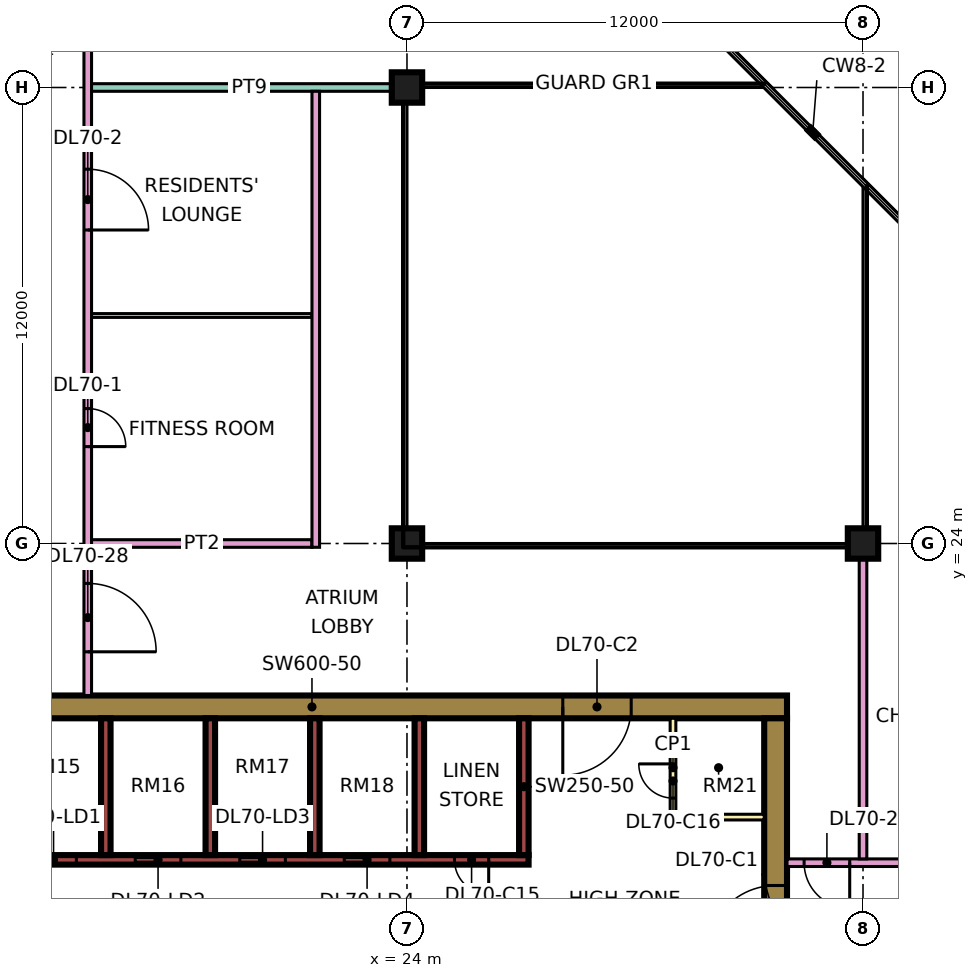
"""IFC4 building model, lengths in metres.
Left out: names, types, materials, properties, quantities, classifications, styles, units other than length and angle.
Written with IfcOpenShell. Run it as: python <this file> out.ifc"""

import sys

from ifc_helpers import new_model, si_unit, direction, frame, frame_2d, origin, origin_2d, place, context, subcontext, project, spatial, rectangle, extrude, element, fill, save


model = new_model("IFC4")
c1 = context("Model", 3, precision=1e-05, world=origin(), true_north=direction((0.0, 1.0)))
c2 = subcontext(c1, "Body", "Model", "MODEL_VIEW")
j1 = project(units=[si_unit("LENGTHUNIT", "METRE"), si_unit("PLANEANGLEUNIT", "RADIAN")], contexts=[c1])
p1 = place(None, origin())
s1 = spatial("IfcSite", under=j1, at=p1, CompositionType="ELEMENT")
p2 = place(p1, origin())
s2 = spatial("IfcBuilding", under=s1, at=p2, CompositionType="ELEMENT")
p3 = place(p2, frame((0.0, 0.0, 299.65)))
s3 = spatial("IfcBuildingStorey", under=s2, at=p3, CompositionType="ELEMENT", Elevation=299.65)
for number, where, z_axis, x_axis in (
    (1, (24.0, 24.0, 0.0), (0.0, 0.0, 1.0), (1.0, 0.0, 0.0)),
    (2, (24.0, 36.0, 0.0), (0.0, 0.0, 1.0), (1.0, 0.0, 0.0)),
    (3, (36.0, 24.0, 0.0), (0.0, 0.0, 1.0), (1.0, 0.0, 0.0)),
):
    element("IfcColumn", number, at=place(p3, frame(where, z_axis=z_axis, x_axis=x_axis)), inside=s3, PredefinedType="COLUMN", context=c2, shape_type="SweptSolid", body=[
        extrude(rectangle(XDim=0.8, YDim=0.8, at=origin_2d()), origin(), (0.0, 0.0, 1.0), 3.75),
    ])
p4 = place(p3, frame((9.0, 19.7, 0.0), z_axis=(0.0, 0.0, 1.0), x_axis=(1.0, 0.0, 0.0)))
e4 = element("IfcWall", 4, at=p4, inside=s3, PredefinedType="SHEAR", context=c2, shape_type="SweptSolid", body=[
    extrude(rectangle(XDim=25.0, YDim=0.6, at=frame_2d((12.5, 0.0))), origin(), (0.0, 0.0, 1.0), 3.75),
])
p5 = place(p4, frame((19.1, 0.0, 0.0)))
e5 = element("IfcOpeningElement", 5, at=p5, cuts=e4, PredefinedType="OPENING", context=c2, shape_type="SweptSolid", body=[
    extrude(rectangle(XDim=1.8, YDim=2.4, at=frame_2d((0.9, 1.2))), frame((0.0, 0.31, 0.0), z_axis=(0.0, -1.0, 0.0), x_axis=(1.0, 0.0, 0.0)), (0.0, 0.0, 1.0), 0.62),
])
p6 = place(p3, frame((33.7, 7.6, 0.0), z_axis=(0.0, 0.0, 1.0), x_axis=(0.0, 1.0, 0.0)))
e6 = element("IfcWall", 6, at=p6, inside=s3, PredefinedType="SHEAR", context=c2, shape_type="SweptSolid", body=[
    extrude(rectangle(XDim=11.8, YDim=0.6, at=frame_2d((5.9, 0.0))), origin(), (0.0, 0.0, 1.0), 3.75),
])
p7 = place(p6, frame((5.6, 0.0, 0.0)))
e7 = element("IfcOpeningElement", 7, at=p7, cuts=e6, PredefinedType="OPENING", context=c2, shape_type="SweptSolid", body=[
    extrude(rectangle(XDim=1.8, YDim=2.4, at=frame_2d((0.9, 1.2))), frame((0.0, 0.31, 0.0), z_axis=(0.0, -1.0, 0.0), x_axis=(1.0, 0.0, 0.0)), (0.0, 0.0, 1.0), 0.62),
])
p8 = place(p3, frame((13.45, 15.675, 0.0), z_axis=(0.0, 0.0, 1.0), x_axis=(1.0, 0.0, 0.0)))
e8 = element("IfcWall", 8, at=p8, inside=s3, PredefinedType="SHEAR", context=c2, shape_type="SweptSolid", body=[
    extrude(rectangle(XDim=13.75, YDim=0.25, at=frame_2d((6.875, 0.0))), origin(), (0.0, 0.0, 1.0), 3.75),
])
p9 = place(p8, frame((0.65, 0.0, 0.0)))
e9 = element("IfcOpeningElement", 9, at=p9, cuts=e8, PredefinedType="OPENING", context=c2, shape_type="SweptSolid", body=[
    extrude(rectangle(XDim=1.2, YDim=2.2, at=frame_2d((0.6, 1.1))), frame((0.0, 0.135, 0.0), z_axis=(0.0, -1.0, 0.0), x_axis=(1.0, 0.0, 0.0)), (0.0, 0.0, 1.0), 0.27),
])
p10 = place(p8, frame((3.4, 0.0, 0.0)))
e10 = element("IfcOpeningElement", 10, at=p10, cuts=e8, PredefinedType="OPENING", context=c2, shape_type="SweptSolid", body=[
    extrude(rectangle(XDim=1.2, YDim=2.2, at=frame_2d((0.6, 1.1))), frame((0.0, 0.135, 0.0), z_axis=(0.0, -1.0, 0.0), x_axis=(1.0, 0.0, 0.0)), (0.0, 0.0, 1.0), 0.27),
])
p11 = place(p8, frame((6.15, 0.0, 0.0)))
e11 = element("IfcOpeningElement", 11, at=p11, cuts=e8, PredefinedType="OPENING", context=c2, shape_type="SweptSolid", body=[
    extrude(rectangle(XDim=1.2, YDim=2.2, at=frame_2d((0.6, 1.1))), frame((0.0, 0.135, 0.0), z_axis=(0.0, -1.0, 0.0), x_axis=(1.0, 0.0, 0.0)), (0.0, 0.0, 1.0), 0.27),
])
p12 = place(p8, frame((8.9, 0.0, 0.0)))
e12 = element("IfcOpeningElement", 12, at=p12, cuts=e8, PredefinedType="OPENING", context=c2, shape_type="SweptSolid", body=[
    extrude(rectangle(XDim=1.2, YDim=2.2, at=frame_2d((0.6, 1.1))), frame((0.0, 0.135, 0.0), z_axis=(0.0, -1.0, 0.0), x_axis=(1.0, 0.0, 0.0)), (0.0, 0.0, 1.0), 0.27),
])
p13 = place(p8, frame((11.8, 0.0, 0.0)))
e13 = element("IfcOpeningElement", 13, at=p13, cuts=e8, PredefinedType="OPENING", context=c2, shape_type="SweptSolid", body=[
    extrude(rectangle(XDim=0.9, YDim=2.1, at=frame_2d((0.45, 1.05))), frame((0.0, 0.135, 0.0), z_axis=(0.0, -1.0, 0.0), x_axis=(1.0, 0.0, 0.0)), (0.0, 0.0, 1.0), 0.27),
])
for number, where, z_axis, x_axis in (
    (14, (16.075, 15.8, 0.0), (0.0, 0.0, 1.0), (0.0, 1.0, 0.0)),
    (15, (18.825, 15.8, 0.0), (0.0, 0.0, 1.0), (0.0, 1.0, 0.0)),
    (16, (21.575, 15.8, 0.0), (0.0, 0.0, 1.0), (0.0, 1.0, 0.0)),
    (17, (24.325, 15.8, 0.0), (0.0, 0.0, 1.0), (0.0, 1.0, 0.0)),
    (18, (27.075, 15.8, 0.0), (0.0, 0.0, 1.0), (0.0, 1.0, 0.0)),
):
    element("IfcWall", number, at=place(p3, frame(where, z_axis=z_axis, x_axis=x_axis)), inside=s3, PredefinedType="SHEAR", context=c2, shape_type="SweptSolid", body=[
        extrude(rectangle(XDim=3.6, YDim=0.25, at=frame_2d((1.8, 0.0))), origin(), (0.0, 0.0, 1.0), 3.75),
    ])
p14 = place(p3, frame((31.0, 16.8, 0.0), z_axis=(0.0, 0.0, 1.0), x_axis=(0.0, 1.0, 0.0)))
e19 = element("IfcWall", 19, at=p14, inside=s3, PredefinedType="PARTITIONING", context=c2, shape_type="SweptSolid", body=[
    extrude(rectangle(XDim=2.6, YDim=0.15, at=frame_2d((1.3, 0.0))), origin(), (0.0, 0.0, 1.0), 3.35),
])
p15 = place(p14, frame((0.5, 0.0, 0.0)))
e20 = element("IfcOpeningElement", 20, at=p15, cuts=e19, PredefinedType="OPENING", context=c2, shape_type="SweptSolid", body=[
    extrude(rectangle(XDim=0.9, YDim=2.1, at=frame_2d((0.45, 1.05))), frame((0.0, 0.085, 0.0), z_axis=(0.0, -1.0, 0.0), x_axis=(1.0, 0.0, 0.0)), (0.0, 0.0, 1.0), 0.17),
])
p16 = place(p3, frame((31.0, 16.8, 0.0), z_axis=(0.0, 0.0, 1.0), x_axis=(1.0, 0.0, 0.0)))
e21 = element("IfcWall", 21, at=p16, inside=s3, PredefinedType="PARTITIONING", context=c2, shape_type="SweptSolid", body=[
    extrude(rectangle(XDim=2.4, YDim=0.15, at=frame_2d((1.2, 0.0))), origin(), (0.0, 0.0, 1.0), 3.35),
])
p17 = place(p3, frame((15.6, 20.0, 0.0), z_axis=(0.0, 0.0, 1.0), x_axis=(0.0, 1.0, 0.0)))
e22 = element("IfcWall", 22, at=p17, inside=s3, PredefinedType="PARTITIONING", context=c2, shape_type="SweptSolid", body=[
    extrude(rectangle(XDim=27.775, YDim=0.2, at=frame_2d((13.887, 0.0))), origin(), (0.0, 0.0, 1.0), 3.35),
])
p18 = place(p17, frame((6.55, 0.0, 0.0)))
e23 = element("IfcOpeningElement", 23, at=p18, cuts=e22, PredefinedType="OPENING", context=c2, shape_type="SweptSolid", body=[
    extrude(rectangle(XDim=1.0, YDim=2.1, at=frame_2d((0.5, 1.05))), frame((0.0, 0.11, 0.0), z_axis=(0.0, -1.0, 0.0), x_axis=(1.0, 0.0, 0.0)), (0.0, 0.0, 1.0), 0.22),
])
p19 = place(p17, frame((12.25, 0.0, 0.0)))
e24 = element("IfcOpeningElement", 24, at=p19, cuts=e22, PredefinedType="OPENING", context=c2, shape_type="SweptSolid", body=[
    extrude(rectangle(XDim=1.6, YDim=2.1, at=frame_2d((0.8, 1.05))), frame((0.0, 0.11, 0.0), z_axis=(0.0, -1.0, 0.0), x_axis=(1.0, 0.0, 0.0)), (0.0, 0.0, 1.0), 0.22),
])
p20 = place(p17, frame((17.2, 0.0, 0.0)))
e25 = element("IfcOpeningElement", 25, at=p20, cuts=e22, PredefinedType="OPENING", context=c2, shape_type="SweptSolid", body=[
    extrude(rectangle(XDim=1.0, YDim=2.1, at=frame_2d((0.5, 1.05))), frame((0.0, 0.11, 0.0), z_axis=(0.0, -1.0, 0.0), x_axis=(1.0, 0.0, 0.0)), (0.0, 0.0, 1.0), 0.22),
])
p21 = place(p17, frame((1.15, 0.0, 0.0)))
e26 = element("IfcOpeningElement", 26, at=p21, cuts=e22, PredefinedType="OPENING", context=c2, shape_type="SweptSolid", body=[
    extrude(rectangle(XDim=1.8, YDim=2.1, at=frame_2d((0.9, 1.05))), frame((0.0, 0.11, 0.0), z_axis=(0.0, -1.0, 0.0), x_axis=(1.0, 0.0, 0.0)), (0.0, 0.0, 1.0), 0.22),
])
p22 = place(p17, frame((25.9, 0.0, 0.0)))
e27 = element("IfcOpeningElement", 27, at=p22, cuts=e22, PredefinedType="OPENING", context=c2, shape_type="SweptSolid", body=[
    extrude(rectangle(XDim=1.0, YDim=2.1, at=frame_2d((0.5, 1.05))), frame((0.0, 0.11, 0.0), z_axis=(0.0, -1.0, 0.0), x_axis=(1.0, 0.0, 0.0)), (0.0, 0.0, 1.0), 0.22),
])
p23 = place(p3, frame((15.7, 24.0, 0.0), z_axis=(0.0, 0.0, 1.0), x_axis=(1.0, 0.0, 0.0)))
e28 = element("IfcWall", 28, at=p23, inside=s3, PredefinedType="PARTITIONING", context=c2, shape_type="SweptSolid", body=[
    extrude(rectangle(XDim=5.8, YDim=0.2, at=frame_2d((2.9, 0.0))), origin(), (0.0, 0.0, 1.0), 3.35),
])
p24 = place(p3, frame((15.7, 30.0, 0.0), z_axis=(0.0, 0.0, 1.0), x_axis=(1.0, 0.0, 0.0)))
e29 = element("IfcWall", 29, at=p24, inside=s3, PredefinedType="PARTITIONING", context=c2, shape_type="SweptSolid", body=[
    extrude(rectangle(XDim=5.8, YDim=0.1, at=frame_2d((2.9, 0.0))), origin(), (0.0, 0.0, 1.0), 3.35),
])
p25 = place(p3, frame((15.7, 36.0, 0.0), z_axis=(0.0, 0.0, 1.0), x_axis=(1.0, 0.0, 0.0)))
e30 = element("IfcWall", 30, at=p25, inside=s3, PredefinedType="PARTITIONING", context=c2, shape_type="SweptSolid", body=[
    extrude(rectangle(XDim=8.3, YDim=0.2, at=frame_2d((4.15, 0.0))), origin(), (0.0, 0.0, 1.0), 3.35),
])
p26 = place(p3, frame((21.6, 23.9, 0.0), z_axis=(0.0, 0.0, 1.0), x_axis=(0.0, 1.0, 0.0)))
e31 = element("IfcWall", 31, at=p26, inside=s3, PredefinedType="PARTITIONING", context=c2, shape_type="SweptSolid", body=[
    extrude(rectangle(XDim=12.0, YDim=0.2, at=frame_2d((6.0, 0.0))), origin(), (0.0, 0.0, 1.0), 3.35),
])
p27 = place(p3, frame((34.0, 15.6, 0.0), z_axis=(0.0, 0.0, 1.0), x_axis=(1.0, 0.0, 0.0)))
e32 = element("IfcWall", 32, at=p27, inside=s3, PredefinedType="PARTITIONING", context=c2, shape_type="SweptSolid", body=[
    extrude(rectangle(XDim=10.35, YDim=0.2, at=frame_2d((5.175, 0.0))), origin(), (0.0, 0.0, 1.0), 3.35),
])
p28 = place(p27, frame((5.6, 0.0, 0.0)))
e33 = element("IfcOpeningElement", 33, at=p28, cuts=e32, PredefinedType="OPENING", context=c2, shape_type="SweptSolid", body=[
    extrude(rectangle(XDim=1.0, YDim=2.1, at=frame_2d((0.5, 1.05))), frame((0.0, 0.11, 0.0), z_axis=(0.0, -1.0, 0.0), x_axis=(1.0, 0.0, 0.0)), (0.0, 0.0, 1.0), 0.22),
])
p29 = place(p27, frame((0.45, 0.0, 0.0)))
e34 = element("IfcOpeningElement", 34, at=p29, cuts=e32, PredefinedType="OPENING", context=c2, shape_type="SweptSolid", body=[
    extrude(rectangle(XDim=1.2, YDim=2.1, at=frame_2d((0.6, 1.05))), frame((0.0, 0.11, 0.0), z_axis=(0.0, -1.0, 0.0), x_axis=(1.0, 0.0, 0.0)), (0.0, 0.0, 1.0), 0.22),
])
p30 = place(p3, frame((36.0, 15.7, 0.0), z_axis=(0.0, 0.0, 1.0), x_axis=(0.0, 1.0, 0.0)))
e35 = element("IfcWall", 35, at=p30, inside=s3, PredefinedType="PARTITIONING", context=c2, shape_type="SweptSolid", body=[
    extrude(rectangle(XDim=8.3, YDim=0.2, at=frame_2d((4.15, 0.0))), origin(), (0.0, 0.0, 1.0), 3.35),
])
p31 = place(p9, origin())
e36 = element("IfcDoor", 36, at=p31, inside=s3, OperationType="DOUBLE_DOOR_SLIDING", PredefinedType="DOOR", context=c2, shape_type="SweptSolid", body=[
    extrude(rectangle(XDim=1.2, YDim=2.2, at=frame_2d((0.6, 1.1))), frame((0.0, 0.025, 0.0), z_axis=(0.0, -1.0, 0.0), x_axis=(1.0, 0.0, 0.0)), (0.0, 0.0, 1.0), 0.05),
])
fill(e9, e36)
p32 = place(p10, origin())
e37 = element("IfcDoor", 37, at=p32, inside=s3, OperationType="DOUBLE_DOOR_SLIDING", PredefinedType="DOOR", context=c2, shape_type="SweptSolid", body=[
    extrude(rectangle(XDim=1.2, YDim=2.2, at=frame_2d((0.6, 1.1))), frame((0.0, 0.025, 0.0), z_axis=(0.0, -1.0, 0.0), x_axis=(1.0, 0.0, 0.0)), (0.0, 0.0, 1.0), 0.05),
])
fill(e10, e37)
p33 = place(p11, origin())
e38 = element("IfcDoor", 38, at=p33, inside=s3, OperationType="DOUBLE_DOOR_SLIDING", PredefinedType="DOOR", context=c2, shape_type="SweptSolid", body=[
    extrude(rectangle(XDim=1.2, YDim=2.2, at=frame_2d((0.6, 1.1))), frame((0.0, 0.025, 0.0), z_axis=(0.0, -1.0, 0.0), x_axis=(1.0, 0.0, 0.0)), (0.0, 0.0, 1.0), 0.05),
])
fill(e11, e38)
p34 = place(p12, origin())
e39 = element("IfcDoor", 39, at=p34, inside=s3, OperationType="DOUBLE_DOOR_SLIDING", PredefinedType="DOOR", context=c2, shape_type="SweptSolid", body=[
    extrude(rectangle(XDim=1.2, YDim=2.2, at=frame_2d((0.6, 1.1))), frame((0.0, 0.025, 0.0), z_axis=(0.0, -1.0, 0.0), x_axis=(1.0, 0.0, 0.0)), (0.0, 0.0, 1.0), 0.05),
])
fill(e12, e39)
p35 = place(p7, origin())
e40 = element("IfcDoor", 40, at=p35, inside=s3, OperationType="DOUBLE_DOOR_SINGLE_SWING", PredefinedType="DOOR", context=c2, shape_type="SweptSolid", body=[
    extrude(rectangle(XDim=1.8, YDim=2.4, at=frame_2d((0.9, 1.2))), frame((0.0, 0.025, 0.0), z_axis=(0.0, -1.0, 0.0), x_axis=(1.0, 0.0, 0.0)), (0.0, 0.0, 1.0), 0.05),
])
fill(e7, e40)
p36 = place(p5, frame((1.8, 0.0, 0.0), z_axis=(0.0, 0.0, 1.0), x_axis=(-1.0, 0.0, 0.0)))
e41 = element("IfcDoor", 41, at=p36, inside=s3, OperationType="DOUBLE_DOOR_SINGLE_SWING", PredefinedType="DOOR", context=c2, shape_type="SweptSolid", body=[
    extrude(rectangle(XDim=1.8, YDim=2.4, at=frame_2d((0.9, 1.2))), frame((0.0, 0.025, 0.0), z_axis=(0.0, -1.0, 0.0), x_axis=(1.0, 0.0, 0.0)), (0.0, 0.0, 1.0), 0.05),
])
fill(e5, e41)
p37 = place(p13, origin())
e42 = element("IfcDoor", 42, at=p37, inside=s3, OperationType="SINGLE_SWING_RIGHT", PredefinedType="DOOR", context=c2, shape_type="SweptSolid", body=[
    extrude(rectangle(XDim=0.9, YDim=2.1, at=frame_2d((0.45, 1.05))), frame((0.0, 0.025, 0.0), z_axis=(0.0, -1.0, 0.0), x_axis=(1.0, 0.0, 0.0)), (0.0, 0.0, 1.0), 0.05),
])
fill(e13, e42)
p38 = place(p15, frame((0.9, 0.0, 0.0), z_axis=(0.0, 0.0, 1.0), x_axis=(-1.0, 0.0, 0.0)))
e43 = element("IfcDoor", 43, at=p38, inside=s3, OperationType="SINGLE_SWING_RIGHT", PredefinedType="DOOR", context=c2, shape_type="SweptSolid", body=[
    extrude(rectangle(XDim=0.9, YDim=2.1, at=frame_2d((0.45, 1.05))), frame((0.0, 0.025, 0.0), z_axis=(0.0, -1.0, 0.0), x_axis=(1.0, 0.0, 0.0)), (0.0, 0.0, 1.0), 0.05),
])
fill(e20, e43)
p39 = place(p18, frame((1.0, 0.0, 0.0), z_axis=(0.0, 0.0, 1.0), x_axis=(-1.0, 0.0, 0.0)))
e44 = element("IfcDoor", 44, at=p39, inside=s3, OperationType="SINGLE_SWING_LEFT", PredefinedType="DOOR", context=c2, shape_type="SweptSolid", body=[
    extrude(rectangle(XDim=1.0, YDim=2.1, at=frame_2d((0.5, 1.05))), frame((0.0, 0.025, 0.0), z_axis=(0.0, -1.0, 0.0), x_axis=(1.0, 0.0, 0.0)), (0.0, 0.0, 1.0), 0.05),
])
fill(e23, e44)
p40 = place(p19, frame((1.6, 0.0, 0.0), z_axis=(0.0, 0.0, 1.0), x_axis=(-1.0, 0.0, 0.0)))
e45 = element("IfcDoor", 45, at=p40, inside=s3, OperationType="DOUBLE_DOOR_SINGLE_SWING", PredefinedType="DOOR", context=c2, shape_type="SweptSolid", body=[
    extrude(rectangle(XDim=1.6, YDim=2.1, at=frame_2d((0.8, 1.05))), frame((0.0, 0.025, 0.0), z_axis=(0.0, -1.0, 0.0), x_axis=(1.0, 0.0, 0.0)), (0.0, 0.0, 1.0), 0.05),
])
fill(e24, e45)
p41 = place(p29, origin())
e46 = element("IfcDoor", 46, at=p41, inside=s3, OperationType="SINGLE_SWING_RIGHT", PredefinedType="DOOR", context=c2, shape_type="SweptSolid", body=[
    extrude(rectangle(XDim=1.2, YDim=2.1, at=frame_2d((0.6, 1.05))), frame((0.0, 0.025, 0.0), z_axis=(0.0, -1.0, 0.0), x_axis=(1.0, 0.0, 0.0)), (0.0, 0.0, 1.0), 0.05),
])
fill(e34, e46)
p42 = place(p21, frame((1.8, 0.0, 0.0), z_axis=(0.0, 0.0, 1.0), x_axis=(-1.0, 0.0, 0.0)))
e47 = element("IfcDoor", 47, at=p42, inside=s3, OperationType="DOUBLE_DOOR_SINGLE_SWING", PredefinedType="DOOR", context=c2, shape_type="SweptSolid", body=[
    extrude(rectangle(XDim=1.8, YDim=2.1, at=frame_2d((0.9, 1.05))), frame((0.0, 0.025, 0.0), z_axis=(0.0, -1.0, 0.0), x_axis=(1.0, 0.0, 0.0)), (0.0, 0.0, 1.0), 0.05),
])
fill(e26, e47)
save(model, sys.argv[1])
